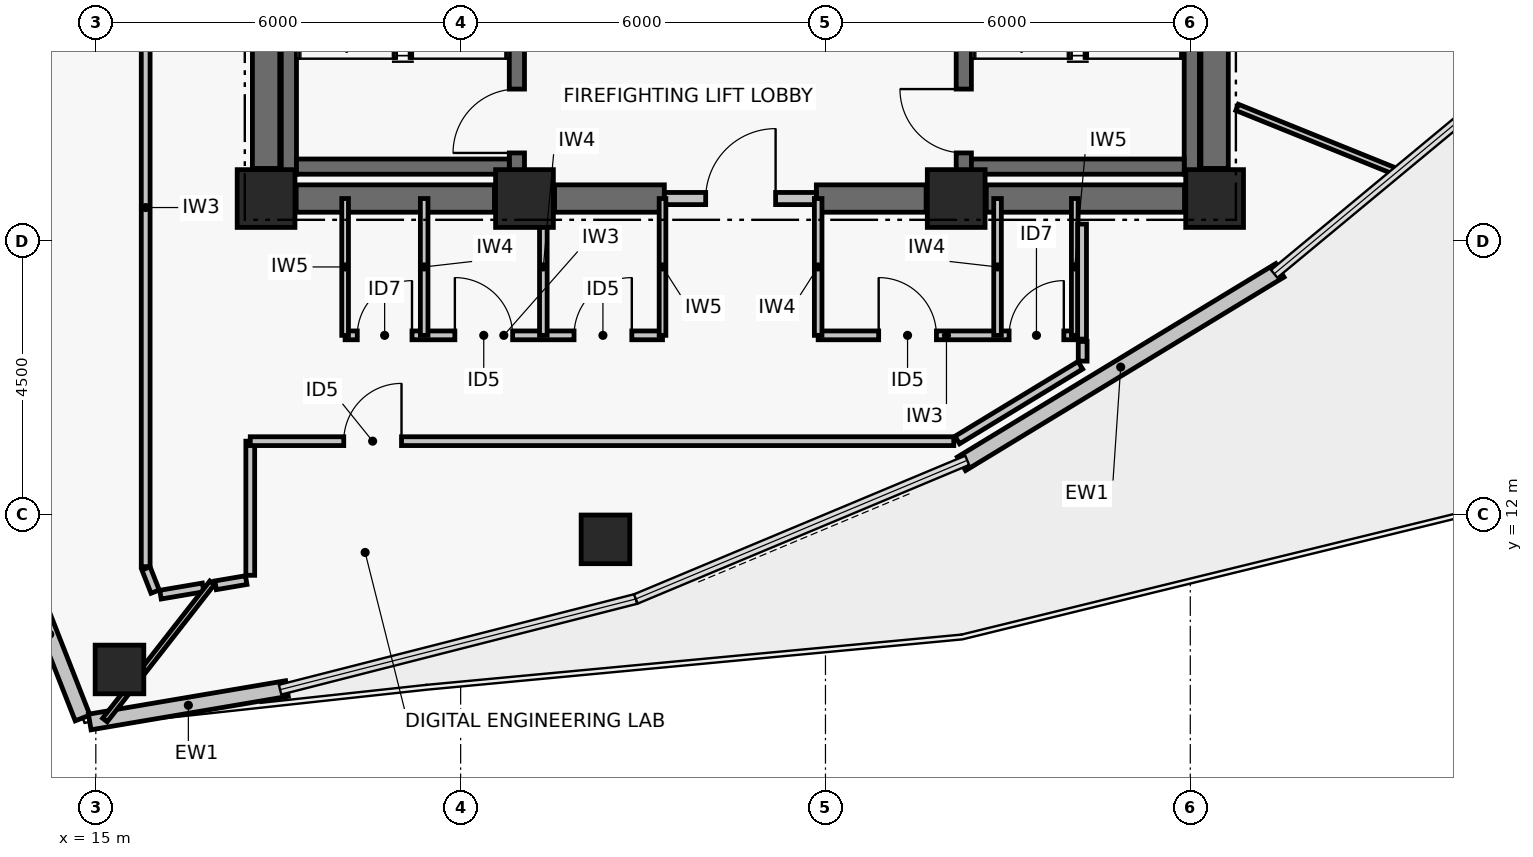
"""IFC4 building model, lengths in metres.
Left out: names, types, materials, properties, quantities, classifications, styles, units other than length and angle.
Written with IfcOpenShell. Run it as: python <this file> out.ifc"""

import sys

from ifc_helpers import new_model, si_unit, direction, frame, frame_2d, origin, origin_2d, place, context, subcontext, project, spatial, rectangle, hollow_rectangle, extrude, element, fill, save


model = new_model("IFC4")
c1 = context("Model", 3, precision=1e-05, world=origin(), true_north=direction((0.0, 1.0)))
c2 = subcontext(c1, "Body", "Model", "MODEL_VIEW")
j1 = project(units=[si_unit("LENGTHUNIT", "METRE"), si_unit("PLANEANGLEUNIT", "RADIAN")], contexts=[c1])
p1 = place(None, origin())
s1 = spatial("IfcSite", under=j1, at=p1, CompositionType="ELEMENT")
p2 = place(p1, origin())
s2 = spatial("IfcBuilding", under=s1, at=p2, CompositionType="ELEMENT")
p3 = place(p2, frame((0.0, 0.0, 247.14)))
s3 = spatial("IfcBuildingStorey", under=s2, at=p3, CompositionType="ELEMENT", Elevation=247.14)
for number, where, z_axis, x_axis in (
    (1, (17.8, 17.2, 0.0), (0.0, 0.0, 1.0), (1.0, 0.0, 0.0)),
    (2, (22.05, 17.2, 0.0), (0.0, 0.0, 1.0), (1.0, 0.0, 0.0)),
    (3, (29.15, 17.2, 0.0), (0.0, 0.0, 1.0), (1.0, 0.0, 0.0)),
    (4, (33.4, 17.2, 0.0), (0.0, 0.0, 1.0), (1.0, 0.0, 0.0)),
):
    element("IfcColumn", number, at=place(p3, frame(where, z_axis=z_axis, x_axis=x_axis)), inside=s3, PredefinedType="COLUMN", context=c2, shape_type="SweptSolid", body=[
        extrude(rectangle(XDim=0.95, YDim=0.95, at=origin_2d()), origin(), (0.0, 0.0, 1.0), 3.72),
    ])
p4 = place(p3, frame((18.295, 17.2, 0.0), z_axis=(0.0, 0.0, 1.0), x_axis=(1.0, 0.0, 0.0)))
e5 = element("IfcWall", 5, at=p4, inside=s3, PredefinedType="SHEAR", context=c2, shape_type="SweptSolid", body=[
    extrude(rectangle(XDim=3.26, YDim=0.45, at=frame_2d((1.63, 0.0))), origin(), (0.0, 0.0, 1.0), 3.5),
])
p5 = place(p3, frame((22.545, 17.2, 0.0), z_axis=(0.0, 0.0, 1.0), x_axis=(1.0, 0.0, 0.0)))
e6 = element("IfcWall", 6, at=p5, inside=s3, PredefinedType="SHEAR", context=c2, shape_type="SweptSolid", body=[
    extrude(rectangle(XDim=1.805, YDim=0.45, at=frame_2d((0.903, 0.0))), origin(), (0.0, 0.0, 1.0), 3.5),
])
p6 = place(p3, frame((26.85, 17.2, 0.0), z_axis=(0.0, 0.0, 1.0), x_axis=(1.0, 0.0, 0.0)))
e7 = element("IfcWall", 7, at=p6, inside=s3, PredefinedType="SHEAR", context=c2, shape_type="SweptSolid", body=[
    extrude(rectangle(XDim=1.805, YDim=0.45, at=frame_2d((0.902, 0.0))), origin(), (0.0, 0.0, 1.0), 3.5),
])
p7 = place(p3, frame((29.645, 17.2, 0.0), z_axis=(0.0, 0.0, 1.0), x_axis=(1.0, 0.0, 0.0)))
e8 = element("IfcWall", 8, at=p7, inside=s3, PredefinedType="SHEAR", context=c2, shape_type="SweptSolid", body=[
    extrude(rectangle(XDim=3.26, YDim=0.45, at=frame_2d((1.63, 0.0))), origin(), (0.0, 0.0, 1.0), 3.5),
])
for number, where, z_axis, x_axis in (
    (9, (17.8, 17.695, 0.0), (0.0, 0.0, 1.0), (0.0, 1.0, 0.0)),
    (10, (33.4, 17.695, 0.0), (0.0, 0.0, 1.0), (0.0, 1.0, 0.0)),
):
    element("IfcWall", number, at=place(p3, frame(where, z_axis=z_axis, x_axis=x_axis)), inside=s3, PredefinedType="SHEAR", context=c2, shape_type="SweptSolid", body=[
        extrude(rectangle(XDim=8.61, YDim=0.45, at=frame_2d((4.305, 0.0))), origin(), (0.0, 0.0, 1.0), 3.5),
    ])
p8 = place(p3, frame((18.175, 17.6, 0.0), z_axis=(0.0, 0.0, 1.0), x_axis=(0.0, 1.0, 0.0)))
e11 = element("IfcWall", 11, at=p8, inside=s3, PredefinedType="SHEAR", context=c2, shape_type="SweptSolid", body=[
    extrude(rectangle(XDim=8.8, YDim=0.25, at=frame_2d((4.4, 0.0))), origin(), (0.0, 0.0, 1.0), 3.5),
])
p9 = place(p3, frame((21.925, 17.6, 0.0), z_axis=(0.0, 0.0, 1.0), x_axis=(0.0, 1.0, 0.0)))
e12 = element("IfcWall", 12, at=p9, inside=s3, PredefinedType="SHEAR", context=c2, shape_type="SweptSolid", body=[
    extrude(rectangle(XDim=8.8, YDim=0.25, at=frame_2d((4.4, 0.0))), origin(), (0.0, 0.0, 1.0), 3.5),
])
p10 = place(p9, frame((0.35, 0.0, 0.0)))
e13 = element("IfcOpeningElement", 13, at=p10, cuts=e12, PredefinedType="OPENING", context=c2, shape_type="SweptSolid", body=[
    extrude(rectangle(XDim=1.05, YDim=2.08, at=frame_2d((0.525, 1.04))), frame((0.0, 0.135, 0.0), z_axis=(0.0, -1.0, 0.0), x_axis=(1.0, 0.0, 0.0)), (0.0, 0.0, 1.0), 0.27),
])
p11 = place(p3, frame((18.3, 17.725, 0.0), z_axis=(0.0, 0.0, 1.0), x_axis=(1.0, 0.0, 0.0)))
e14 = element("IfcWall", 14, at=p11, inside=s3, PredefinedType="SHEAR", context=c2, shape_type="SweptSolid", body=[
    extrude(rectangle(XDim=3.5, YDim=0.25, at=frame_2d((1.75, 0.0))), origin(), (0.0, 0.0, 1.0), 3.5),
])
p12 = place(p3, frame((29.275, 17.6, 0.0), z_axis=(0.0, 0.0, 1.0), x_axis=(0.0, 1.0, 0.0)))
e15 = element("IfcWall", 15, at=p12, inside=s3, PredefinedType="SHEAR", context=c2, shape_type="SweptSolid", body=[
    extrude(rectangle(XDim=8.8, YDim=0.25, at=frame_2d((4.4, 0.0))), origin(), (0.0, 0.0, 1.0), 3.5),
])
p13 = place(p12, frame((0.35, 0.0, 0.0)))
e16 = element("IfcOpeningElement", 16, at=p13, cuts=e15, PredefinedType="OPENING", context=c2, shape_type="SweptSolid", body=[
    extrude(rectangle(XDim=1.05, YDim=2.08, at=frame_2d((0.525, 1.04))), frame((0.0, 0.135, 0.0), z_axis=(0.0, -1.0, 0.0), x_axis=(1.0, 0.0, 0.0)), (0.0, 0.0, 1.0), 0.27),
])
p14 = place(p3, frame((33.025, 17.6, 0.0), z_axis=(0.0, 0.0, 1.0), x_axis=(0.0, 1.0, 0.0)))
e17 = element("IfcWall", 17, at=p14, inside=s3, PredefinedType="SHEAR", context=c2, shape_type="SweptSolid", body=[
    extrude(rectangle(XDim=8.8, YDim=0.25, at=frame_2d((4.4, 0.0))), origin(), (0.0, 0.0, 1.0), 3.5),
])
p15 = place(p3, frame((29.4, 17.725, 0.0), z_axis=(0.0, 0.0, 1.0), x_axis=(1.0, 0.0, 0.0)))
e18 = element("IfcWall", 18, at=p15, inside=s3, PredefinedType="SHEAR", context=c2, shape_type="SweptSolid", body=[
    extrude(rectangle(XDim=3.5, YDim=0.25, at=frame_2d((1.75, 0.0))), origin(), (0.0, 0.0, 1.0), 3.5),
])
for number, where, z_axis, x_axis in (
    (19, (15.389, 9.455, 0.0), (0.0, 0.0, 1.0), (1.0, 0.0, 0.0)),
    (20, (23.382, 11.595, 0.0), (0.0, 0.0, 1.0), (1.0, 0.0, 0.0)),
):
    element("IfcColumn", number, at=place(p3, frame(where, z_axis=z_axis, x_axis=x_axis)), inside=s3, PredefinedType="COLUMN", context=c2, shape_type="SweptSolid", body=[
        extrude(hollow_rectangle(XDim=0.8, YDim=0.8, WallThickness=0.035, at=origin_2d()), origin(), (0.0, 0.0, 1.0), 3.72),
    ])
p16 = place(p3, frame((14.782, 8.658, 0.0), z_axis=(0.0, 0.0, 1.0), x_axis=(-0.365529693114, 0.930799679551, 0.0)))
e21 = element("IfcWall", 21, at=p16, inside=s3, PredefinedType="PARTITIONING", context=c2, shape_type="SweptSolid", body=[
    extrude(rectangle(XDim=2.956, YDim=0.26, at=frame_2d((1.478, 0.0))), origin(), (0.0, 0.0, 1.0), 3.5),
])
p17 = place(p3, frame((18.144, 9.142, 0.0), z_axis=(0.0, 0.0, 1.0), x_axis=(-0.985885871317, -0.167418782513, 0.0)))
e22 = element("IfcWall", 22, at=p17, inside=s3, PredefinedType="PARTITIONING", context=c2, shape_type="SweptSolid", body=[
    extrude(rectangle(XDim=3.29, YDim=0.26, at=frame_2d((1.645, 0.0))), origin(), (0.0, 0.0, 1.0), 3.5),
])
p18 = place(p3, frame((34.474, 16.019, 0.0), z_axis=(0.0, 0.0, 1.0), x_axis=(-0.854667549998, -0.519175672563, 0.0)))
e23 = element("IfcWall", 23, at=p18, inside=s3, PredefinedType="PARTITIONING", context=c2, shape_type="SweptSolid", body=[
    extrude(rectangle(XDim=6.127, YDim=0.26, at=frame_2d((3.063, 0.0))), origin(), (0.0, 0.0, 1.0), 3.5),
])
p19 = place(p3, frame((24.35, 17.2, 0.0), z_axis=(0.0, 0.0, 1.0), x_axis=(1.0, 0.0, 0.0)))
e24 = element("IfcWall", 24, at=p19, inside=s3, PredefinedType="PARTITIONING", context=c2, shape_type="SweptSolid", body=[
    extrude(rectangle(XDim=2.5, YDim=0.2, at=frame_2d((1.25, 0.0))), origin(), (0.0, 0.0, 1.0), 2.63),
])
p20 = place(p19, frame((0.68, 0.0, 0.0)))
e25 = element("IfcOpeningElement", 25, at=p20, cuts=e24, PredefinedType="OPENING", context=c2, shape_type="SweptSolid", body=[
    extrude(rectangle(XDim=1.15, YDim=2.08, at=frame_2d((0.575, 1.04))), frame((0.0, 0.11, 0.0), z_axis=(0.0, -1.0, 0.0), x_axis=(1.0, 0.0, 0.0)), (0.0, 0.0, 1.0), 0.22),
])
p21 = place(p3, frame((19.1, 14.95, 0.0), z_axis=(0.0, 0.0, 1.0), x_axis=(1.0, 0.0, 0.0)))
e26 = element("IfcWall", 26, at=p21, inside=s3, PredefinedType="PARTITIONING", context=c2, shape_type="SweptSolid", body=[
    extrude(rectangle(XDim=5.22, YDim=0.145, at=frame_2d((2.61, 0.0))), origin(), (0.0, 0.0, 1.0), 2.78),
])
p22 = place(p21, frame((0.2, 0.0, 0.0)))
e27 = element("IfcOpeningElement", 27, at=p22, cuts=e26, PredefinedType="OPENING", context=c2, shape_type="SweptSolid", body=[
    extrude(rectangle(XDim=0.9, YDim=2.02, at=frame_2d((0.45, 1.01))), frame((0.0, 0.083, 0.0), z_axis=(0.0, -1.0, 0.0), x_axis=(1.0, 0.0, 0.0)), (0.0, 0.0, 1.0), 0.165),
])
p23 = place(p21, frame((1.805, 0.0, 0.0)))
e28 = element("IfcOpeningElement", 28, at=p23, cuts=e26, PredefinedType="OPENING", context=c2, shape_type="SweptSolid", body=[
    extrude(rectangle(XDim=0.95, YDim=2.06, at=frame_2d((0.475, 1.03))), frame((0.0, 0.083, 0.0), z_axis=(0.0, -1.0, 0.0), x_axis=(1.0, 0.0, 0.0)), (0.0, 0.0, 1.0), 0.165),
])
p24 = place(p21, frame((3.765, 0.0, 0.0)))
e29 = element("IfcOpeningElement", 29, at=p24, cuts=e26, PredefinedType="OPENING", context=c2, shape_type="SweptSolid", body=[
    extrude(rectangle(XDim=0.95, YDim=2.06, at=frame_2d((0.475, 1.03))), frame((0.0, 0.083, 0.0), z_axis=(0.0, -1.0, 0.0), x_axis=(1.0, 0.0, 0.0)), (0.0, 0.0, 1.0), 0.165),
])
p25 = place(p3, frame((26.88, 14.95, 0.0), z_axis=(0.0, 0.0, 1.0), x_axis=(1.0, 0.0, 0.0)))
e30 = element("IfcWall", 30, at=p25, inside=s3, PredefinedType="PARTITIONING", context=c2, shape_type="SweptSolid", body=[
    extrude(rectangle(XDim=4.22, YDim=0.145, at=frame_2d((2.11, 0.0))), origin(), (0.0, 0.0, 1.0), 2.98),
])
p26 = place(p25, frame((0.995, 0.0, 0.0)))
e31 = element("IfcOpeningElement", 31, at=p26, cuts=e30, PredefinedType="OPENING", context=c2, shape_type="SweptSolid", body=[
    extrude(rectangle(XDim=0.95, YDim=2.06, at=frame_2d((0.475, 1.03))), frame((0.0, 0.083, 0.0), z_axis=(0.0, -1.0, 0.0), x_axis=(1.0, 0.0, 0.0)), (0.0, 0.0, 1.0), 0.165),
])
p27 = place(p25, frame((3.14, 0.0, 0.0)))
e32 = element("IfcOpeningElement", 32, at=p27, cuts=e30, PredefinedType="OPENING", context=c2, shape_type="SweptSolid", body=[
    extrude(rectangle(XDim=0.9, YDim=2.02, at=frame_2d((0.45, 1.01))), frame((0.0, 0.083, 0.0), z_axis=(0.0, -1.0, 0.0), x_axis=(1.0, 0.0, 0.0)), (0.0, 0.0, 1.0), 0.165),
])
p28 = place(p3, frame((19.1, 14.95, 0.0), z_axis=(0.0, 0.0, 1.0), x_axis=(0.0, 1.0, 0.0)))
e33 = element("IfcWall", 33, at=p28, inside=s3, PredefinedType="PARTITIONING", context=c2, shape_type="SweptSolid", body=[
    extrude(rectangle(XDim=2.25, YDim=0.11, at=frame_2d((1.125, 0.0))), origin(), (0.0, 0.0, 1.0), 2.63),
])
for number, where, z_axis, x_axis in (
    (34, (20.4, 14.95, 0.0), (0.0, 0.0, 1.0), (0.0, 1.0, 0.0)),
    (35, (22.36, 14.95, 0.0), (0.0, 0.0, 1.0), (0.0, 1.0, 0.0)),
):
    element("IfcWall", number, at=place(p3, frame(where, z_axis=z_axis, x_axis=x_axis)), inside=s3, PredefinedType="PARTITIONING", context=c2, shape_type="SweptSolid", body=[
        extrude(rectangle(XDim=2.25, YDim=0.125, at=frame_2d((1.125, 0.0))), origin(), (0.0, 0.0, 1.0), 2.63),
    ])
p29 = place(p3, frame((24.32, 14.95, 0.0), z_axis=(0.0, 0.0, 1.0), x_axis=(0.0, 1.0, 0.0)))
e36 = element("IfcWall", 36, at=p29, inside=s3, PredefinedType="PARTITIONING", context=c2, shape_type="SweptSolid", body=[
    extrude(rectangle(XDim=2.25, YDim=0.11, at=frame_2d((1.125, 0.0))), origin(), (0.0, 0.0, 1.0), 2.63),
])
for number, where, z_axis, x_axis in (
    (37, (26.88, 14.95, 0.0), (0.0, 0.0, 1.0), (0.0, 1.0, 0.0)),
    (38, (29.83, 14.95, 0.0), (0.0, 0.0, 1.0), (0.0, 1.0, 0.0)),
):
    element("IfcWall", number, at=place(p3, frame(where, z_axis=z_axis, x_axis=x_axis)), inside=s3, PredefinedType="PARTITIONING", context=c2, shape_type="SweptSolid", body=[
        extrude(rectangle(XDim=2.25, YDim=0.125, at=frame_2d((1.125, 0.0))), origin(), (0.0, 0.0, 1.0), 2.63),
    ])
p30 = place(p3, frame((31.1, 14.95, 0.0), z_axis=(0.0, 0.0, 1.0), x_axis=(0.0, 1.0, 0.0)))
e39 = element("IfcWall", 39, at=p30, inside=s3, PredefinedType="PARTITIONING", context=c2, shape_type="SweptSolid", body=[
    extrude(rectangle(XDim=2.25, YDim=0.11, at=frame_2d((1.125, 0.0))), origin(), (0.0, 0.0, 1.0), 2.63),
])
p31 = place(p3, frame((15.82, 22.958, 0.0), z_axis=(0.0, 0.0, 1.0), x_axis=(0.0, -1.0, 0.0)))
e40 = element("IfcWall", 40, at=p31, inside=s3, PredefinedType="PARTITIONING", context=c2, shape_type="SweptSolid", body=[
    extrude(rectangle(XDim=11.811, YDim=0.145, at=frame_2d((5.906, 0.0))), origin(), (0.0, 0.0, 1.0), 2.78),
])
p32 = place(p31, frame((0.28, 0.0, 0.0)))
e41 = element("IfcOpeningElement", 41, at=p32, cuts=e40, PredefinedType="OPENING", context=c2, shape_type="SweptSolid", body=[
    extrude(rectangle(XDim=0.95, YDim=2.06, at=frame_2d((0.475, 1.03))), frame((0.0, 0.083, 0.0), z_axis=(0.0, -1.0, 0.0), x_axis=(1.0, 0.0, 0.0)), (0.0, 0.0, 1.0), 0.165),
])
p33 = place(p3, frame((15.825, 11.117, 0.0), z_axis=(0.0, 0.0, 1.0), x_axis=(0.365633948196, -0.930758731319, 0.0)))
e42 = element("IfcWall", 42, at=p33, inside=s3, PredefinedType="PARTITIONING", context=c2, shape_type="SweptSolid", body=[
    extrude(rectangle(XDim=0.41, YDim=0.145, at=frame_2d((0.205, 0.0))), origin(), (0.0, 0.0, 1.0), 2.78),
])
p34 = place(p3, frame((16.063, 10.686, 0.0), z_axis=(0.0, 0.0, 1.0), x_axis=(0.985869455419, 0.167515422787, 0.0)))
e43 = element("IfcWall", 43, at=p34, inside=s3, PredefinedType="PARTITIONING", context=c2, shape_type="SweptSolid", body=[
    extrude(rectangle(XDim=0.711, YDim=0.145, at=frame_2d((0.355, 0.0))), origin(), (0.0, 0.0, 1.0), 3.13),
])
p35 = place(p3, frame((16.969, 10.839, 0.0), z_axis=(0.0, 0.0, 1.0), x_axis=(0.985873186984, 0.167493460131, 0.0)))
e44 = element("IfcWall", 44, at=p35, inside=s3, PredefinedType="PARTITIONING", context=c2, shape_type="SweptSolid", body=[
    extrude(rectangle(XDim=0.512, YDim=0.145, at=frame_2d((0.256, 0.0))), origin(), (0.0, 0.0, 1.0), 3.5),
])
p36 = place(p3, frame((17.54, 11.004, 0.0), z_axis=(0.0, 0.0, 1.0), x_axis=(0.0, 1.0, 0.0)))
e45 = element("IfcWall", 45, at=p36, inside=s3, PredefinedType="PARTITIONING", context=c2, shape_type="SweptSolid", body=[
    extrude(rectangle(XDim=2.206, YDim=0.145, at=frame_2d((1.103, 0.0))), origin(), (0.0, 0.0, 1.0), 3.13),
])
p37 = place(p3, frame((17.54, 13.21, 0.0), z_axis=(0.0, 0.0, 1.0), x_axis=(1.0, 0.0, 0.0)))
e46 = element("IfcWall", 46, at=p37, inside=s3, PredefinedType="PARTITIONING", context=c2, shape_type="SweptSolid", body=[
    extrude(rectangle(XDim=11.57, YDim=0.145, at=frame_2d((5.785, 0.0))), origin(), (0.0, 0.0, 1.0), 2.78),
])
p38 = place(p37, frame((1.538, 0.0, 0.0)))
e47 = element("IfcOpeningElement", 47, at=p38, cuts=e46, PredefinedType="OPENING", context=c2, shape_type="SweptSolid", body=[
    extrude(rectangle(XDim=0.95, YDim=2.06, at=frame_2d((0.475, 1.03))), frame((0.0, 0.083, 0.0), z_axis=(0.0, -1.0, 0.0), x_axis=(1.0, 0.0, 0.0)), (0.0, 0.0, 1.0), 0.165),
])
p39 = place(p3, frame((29.168, 13.229, 0.0), z_axis=(0.0, 0.0, 1.0), x_axis=(0.854678044033, 0.519158396876, 0.0)))
e48 = element("IfcWall", 48, at=p39, inside=s3, PredefinedType="PARTITIONING", context=c2, shape_type="SweptSolid", body=[
    extrude(rectangle(XDim=2.368, YDim=0.145, at=frame_2d((1.184, 0.0))), origin(), (0.0, 0.0, 1.0), 3.5),
])
p40 = place(p3, frame((31.23, 14.526, 0.0), z_axis=(0.0, 0.0, 1.0), x_axis=(0.0, 1.0, 0.0)))
e49 = element("IfcWall", 49, at=p40, inside=s3, PredefinedType="PARTITIONING", context=c2, shape_type="SweptSolid", body=[
    extrude(rectangle(XDim=0.324, YDim=0.145, at=frame_2d((0.162, 0.0))), origin(), (0.0, 0.0, 1.0), 3.5),
])
p41 = place(p3, frame((31.22, 14.889, 0.0), z_axis=(0.0, 0.0, 1.0), x_axis=(0.0, 1.0, 0.0)))
e50 = element("IfcWall", 50, at=p41, inside=s3, PredefinedType="PARTITIONING", context=c2, shape_type="SweptSolid", body=[
    extrude(rectangle(XDim=1.891, YDim=0.145, at=frame_2d((0.946, 0.0))), origin(), (0.0, 0.0, 1.0), 2.63),
])
p42 = place(p3, frame((16.913, 10.881, 0.0), z_axis=(0.0, 0.0, 1.0), x_axis=(-0.615662236592, -0.788010158839, 0.0)))
e51 = element("IfcWall", 51, at=p42, inside=s3, PredefinedType="PARTITIONING", context=c2, shape_type="SweptSolid", body=[
    extrude(rectangle(XDim=2.864, YDim=0.095, at=frame_2d((1.432, 0.0))), origin(), (0.0, 0.0, 1.0), 2.98),
])
p43 = place(p3, frame((33.77, 18.699, 0.0), z_axis=(0.0, 0.0, 1.0), x_axis=(0.92715823081, -0.374670008197, 0.0)))
e52 = element("IfcWall", 52, at=p43, inside=s3, PredefinedType="PARTITIONING", context=c2, shape_type="SweptSolid", body=[
    extrude(rectangle(XDim=2.848, YDim=0.11, at=frame_2d((1.424, 0.0))), origin(), (0.0, 0.0, 1.0), 2.63),
])
p44 = place(p10, origin())
e53 = element("IfcDoor", 53, at=p44, inside=s3, OperationType="SINGLE_SWING_LEFT", PredefinedType="DOOR", context=c2, shape_type="SweptSolid", body=[
    extrude(rectangle(XDim=1.05, YDim=2.08, at=frame_2d((0.525, 1.04))), frame((0.0, 0.025, 0.0), z_axis=(0.0, -1.0, 0.0), x_axis=(1.0, 0.0, 0.0)), (0.0, 0.0, 1.0), 0.05),
])
fill(e13, e53)
p45 = place(p13, origin())
e54 = element("IfcDoor", 54, at=p45, inside=s3, OperationType="SINGLE_SWING_RIGHT", PredefinedType="DOOR", context=c2, shape_type="SweptSolid", body=[
    extrude(rectangle(XDim=1.05, YDim=2.08, at=frame_2d((0.525, 1.04))), frame((0.0, 0.025, 0.0), z_axis=(0.0, -1.0, 0.0), x_axis=(1.0, 0.0, 0.0)), (0.0, 0.0, 1.0), 0.05),
])
fill(e16, e54)
p46 = place(p20, origin())
e55 = element("IfcDoor", 55, at=p46, inside=s3, OperationType="SINGLE_SWING_RIGHT", PredefinedType="DOOR", context=c2, shape_type="SweptSolid", body=[
    extrude(rectangle(XDim=1.15, YDim=2.08, at=frame_2d((0.575, 1.04))), frame((0.0, 0.025, 0.0), z_axis=(0.0, -1.0, 0.0), x_axis=(1.0, 0.0, 0.0)), (0.0, 0.0, 1.0), 0.05),
])
fill(e25, e55)
p47 = place(p22, origin())
e56 = element("IfcDoor", 56, at=p47, inside=s3, OperationType="SINGLE_SWING_RIGHT", PredefinedType="DOOR", context=c2, shape_type="SweptSolid", body=[
    extrude(rectangle(XDim=0.9, YDim=2.02, at=frame_2d((0.45, 1.01))), frame((0.0, 0.025, 0.0), z_axis=(0.0, -1.0, 0.0), x_axis=(1.0, 0.0, 0.0)), (0.0, 0.0, 1.0), 0.05),
])
fill(e27, e56)
p48 = place(p23, origin())
e57 = element("IfcDoor", 57, at=p48, inside=s3, OperationType="SINGLE_SWING_LEFT", PredefinedType="DOOR", context=c2, shape_type="SweptSolid", body=[
    extrude(rectangle(XDim=0.95, YDim=2.06, at=frame_2d((0.475, 1.03))), frame((0.0, 0.025, 0.0), z_axis=(0.0, -1.0, 0.0), x_axis=(1.0, 0.0, 0.0)), (0.0, 0.0, 1.0), 0.05),
])
fill(e28, e57)
p49 = place(p24, origin())
e58 = element("IfcDoor", 58, at=p49, inside=s3, OperationType="SINGLE_SWING_RIGHT", PredefinedType="DOOR", context=c2, shape_type="SweptSolid", body=[
    extrude(rectangle(XDim=0.95, YDim=2.06, at=frame_2d((0.475, 1.03))), frame((0.0, 0.025, 0.0), z_axis=(0.0, -1.0, 0.0), x_axis=(1.0, 0.0, 0.0)), (0.0, 0.0, 1.0), 0.05),
])
fill(e29, e58)
p50 = place(p26, origin())
e59 = element("IfcDoor", 59, at=p50, inside=s3, OperationType="SINGLE_SWING_LEFT", PredefinedType="DOOR", context=c2, shape_type="SweptSolid", body=[
    extrude(rectangle(XDim=0.95, YDim=2.06, at=frame_2d((0.475, 1.03))), frame((0.0, 0.025, 0.0), z_axis=(0.0, -1.0, 0.0), x_axis=(1.0, 0.0, 0.0)), (0.0, 0.0, 1.0), 0.05),
])
fill(e31, e59)
p51 = place(p27, origin())
e60 = element("IfcDoor", 60, at=p51, inside=s3, OperationType="SINGLE_SWING_RIGHT", PredefinedType="DOOR", context=c2, shape_type="SweptSolid", body=[
    extrude(rectangle(XDim=0.9, YDim=2.02, at=frame_2d((0.45, 1.01))), frame((0.0, 0.025, 0.0), z_axis=(0.0, -1.0, 0.0), x_axis=(1.0, 0.0, 0.0)), (0.0, 0.0, 1.0), 0.05),
])
fill(e32, e60)
p52 = place(p38, origin())
e61 = element("IfcDoor", 61, at=p52, inside=s3, OperationType="SINGLE_SWING_RIGHT", PredefinedType="DOOR", context=c2, shape_type="SweptSolid", body=[
    extrude(rectangle(XDim=0.95, YDim=2.06, at=frame_2d((0.475, 1.03))), frame((0.0, 0.025, 0.0), z_axis=(0.0, -1.0, 0.0), x_axis=(1.0, 0.0, 0.0)), (0.0, 0.0, 1.0), 0.05),
])
fill(e47, e61)
save(model, sys.argv[1])
